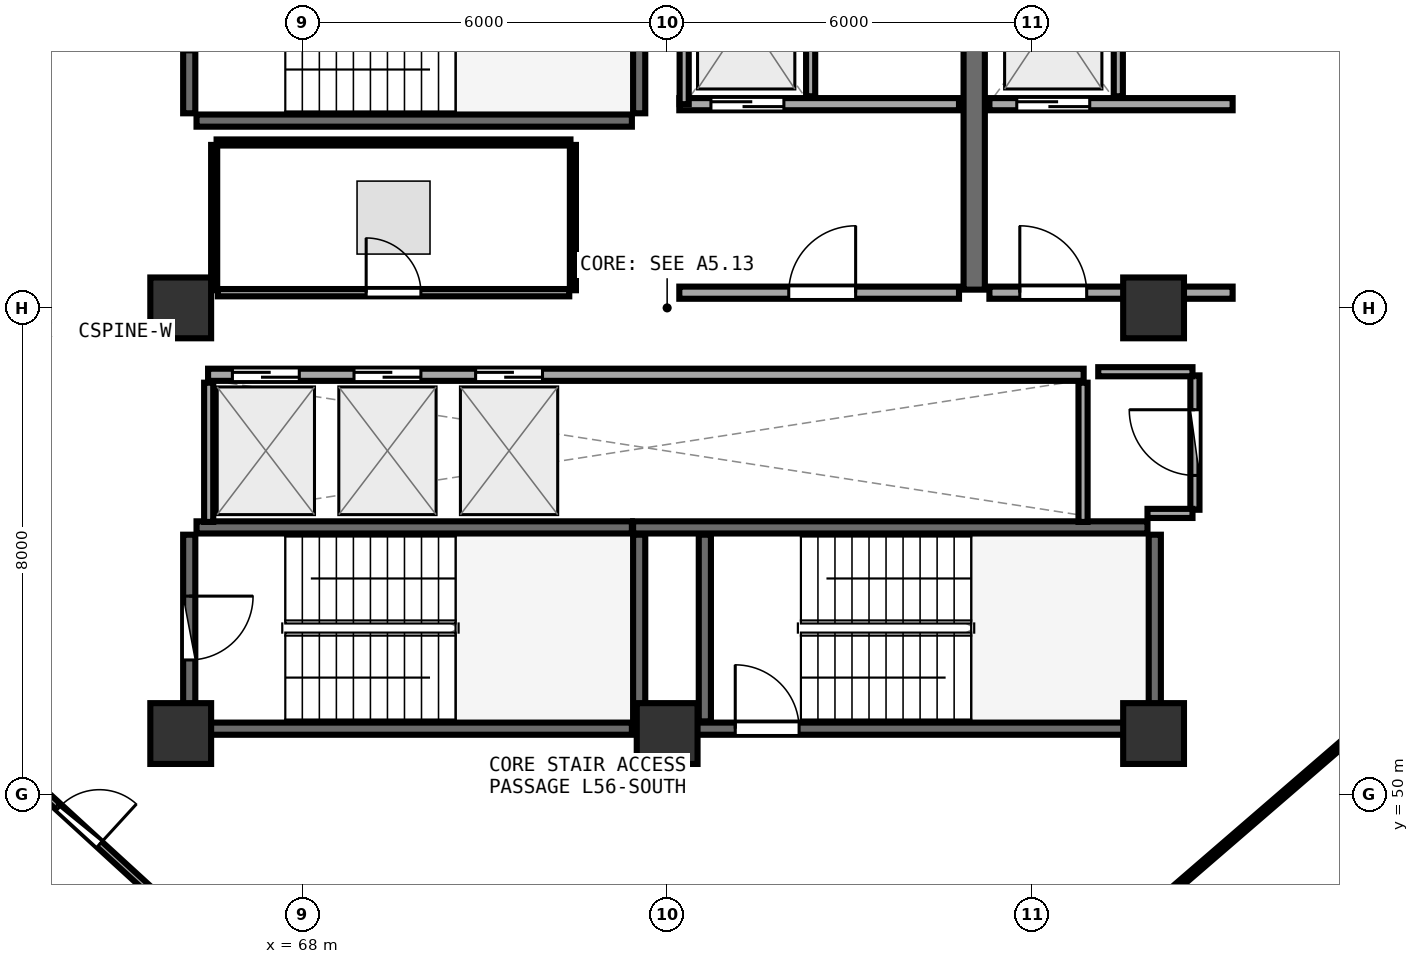
"""IFC4 building model, lengths in metres.
Left out: names, types, materials, properties, quantities, classifications, styles, units other than length and angle.
Written with IfcOpenShell. Run it as: python <this file> out.ifc"""

import sys

from ifc_helpers import new_model, si_unit, direction, frame, frame_2d, origin, origin_2d, place, context, subcontext, project, spatial, rectangle, extrude, element, fill, save


model = new_model("IFC4")
c1 = context("Model", 3, precision=1e-05, world=origin(), true_north=direction((0.0, 1.0)))
c2 = subcontext(c1, "Body", "Model", "MODEL_VIEW")
j1 = project(units=[si_unit("LENGTHUNIT", "METRE"), si_unit("PLANEANGLEUNIT", "RADIAN")], contexts=[c1])
p1 = place(None, origin())
s1 = spatial("IfcSite", under=j1, at=p1, CompositionType="ELEMENT")
p2 = place(p1, origin())
s2 = spatial("IfcBuilding", under=s1, at=p2, CompositionType="ELEMENT")
p3 = place(p2, frame((0.0, 0.0, 219.45)))
s3 = spatial("IfcBuildingStorey", under=s2, at=p3, CompositionType="ELEMENT", Elevation=219.45)
for number, where, z_axis, x_axis in (
    (1, (66.0, 51.0, 0.0), (0.0, 0.0, 1.0), (1.0, 0.0, 0.0)),
    (2, (74.0, 51.0, 0.0), (0.0, 0.0, 1.0), (1.0, 0.0, 0.0)),
    (3, (82.0, 51.0, 0.0), (0.0, 0.0, 1.0), (1.0, 0.0, 0.0)),
    (4, (82.0, 58.0, 0.0), (0.0, 0.0, 1.0), (1.0, 0.0, 0.0)),
    (5, (66.0, 58.0, 0.0), (0.0, 0.0, 1.0), (1.0, 0.0, 0.0)),
):
    element("IfcColumn", number, at=place(p3, frame(where, z_axis=z_axis, x_axis=x_axis)), inside=s3, PredefinedType="PILASTER", context=c2, shape_type="SweptSolid", body=[
        extrude(rectangle(XDim=1.0, YDim=1.0, at=origin_2d()), origin(), (0.0, 0.0, 1.0), 3.75),
    ])
p4 = place(p3, frame((66.26, 61.08, 0.0), z_axis=(0.0, 0.0, 1.0), x_axis=(1.0, 0.0, 0.0)))
e6 = element("IfcWall", 6, at=p4, inside=s3, PredefinedType="SHEAR", context=c2, shape_type="SweptSolid", body=[
    extrude(rectangle(XDim=7.16, YDim=0.2, at=frame_2d((3.58, 0.0))), origin(), (0.0, 0.0, 1.0), 3.49),
])
p5 = place(p3, frame((73.54, 61.2, 0.0), z_axis=(0.0, 0.0, 1.0), x_axis=(0.0, 1.0, 0.0)))
e7 = element("IfcWall", 7, at=p5, inside=s3, PredefinedType="SHEAR", context=c2, shape_type="SweptSolid", body=[
    extrude(rectangle(XDim=3.07, YDim=0.2, at=frame_2d((1.535, 0.0))), origin(), (0.0, 0.0, 1.0), 3.49),
])
p6 = place(p3, frame((66.14, 64.27, 0.0), z_axis=(0.0, 0.0, 1.0), x_axis=(0.0, -1.0, 0.0)))
e8 = element("IfcWall", 8, at=p6, inside=s3, PredefinedType="SHEAR", context=c2, shape_type="SweptSolid", body=[
    extrude(rectangle(XDim=3.07, YDim=0.2, at=frame_2d((1.535, 0.0))), origin(), (0.0, 0.0, 1.0), 3.49),
])
p7 = place(p6, frame((1.01, 0.0, 0.0)))
e9 = element("IfcOpeningElement", 9, at=p7, cuts=e8, PredefinedType="OPENING", context=c2, shape_type="SweptSolid", body=[
    extrude(rectangle(XDim=1.05, YDim=2.1, at=frame_2d((0.525, 1.05))), frame((0.0, 0.11, 0.0), z_axis=(0.0, -1.0, 0.0), x_axis=(1.0, 0.0, 0.0)), (0.0, 0.0, 1.0), 0.22),
])
p8 = place(p3, frame((74.0, 51.08, 0.0), z_axis=(0.0, 0.0, 1.0), x_axis=(1.0, 0.0, 0.0)))
e10 = element("IfcWall", 10, at=p8, inside=s3, PredefinedType="SHEAR", context=c2, shape_type="SweptSolid", body=[
    extrude(rectangle(XDim=7.9, YDim=0.2, at=frame_2d((3.95, 0.0))), origin(), (0.0, 0.0, 1.0), 3.49),
])
p9 = place(p8, frame((1.12, 0.0, 0.0)))
e11 = element("IfcOpeningElement", 11, at=p9, cuts=e10, PredefinedType="OPENING", context=c2, shape_type="SweptSolid", body=[
    extrude(rectangle(XDim=1.05, YDim=2.1, at=frame_2d((0.525, 1.05))), frame((0.0, 0.11, 0.0), z_axis=(0.0, -1.0, 0.0), x_axis=(1.0, 0.0, 0.0)), (0.0, 0.0, 1.0), 0.22),
])
p10 = place(p3, frame((82.02, 51.2, 0.0), z_axis=(0.0, 0.0, 1.0), x_axis=(0.0, 1.0, 0.0)))
e12 = element("IfcWall", 12, at=p10, inside=s3, PredefinedType="SHEAR", context=c2, shape_type="SweptSolid", body=[
    extrude(rectangle(XDim=3.07, YDim=0.2, at=frame_2d((1.535, 0.0))), origin(), (0.0, 0.0, 1.0), 3.49),
])
p11 = place(p3, frame((81.9, 54.39, 0.0), z_axis=(0.0, 0.0, 1.0), x_axis=(-1.0, 0.0, 0.0)))
e13 = element("IfcWall", 13, at=p11, inside=s3, PredefinedType="SHEAR", context=c2, shape_type="SweptSolid", body=[
    extrude(rectangle(XDim=8.46, YDim=0.2, at=frame_2d((4.23, 0.0))), origin(), (0.0, 0.0, 1.0), 3.49),
])
p12 = place(p3, frame((74.62, 54.27, 0.0), z_axis=(0.0, 0.0, 1.0), x_axis=(0.0, -1.0, 0.0)))
e14 = element("IfcWall", 14, at=p12, inside=s3, PredefinedType="SHEAR", context=c2, shape_type="SweptSolid", body=[
    extrude(rectangle(XDim=3.07, YDim=0.2, at=frame_2d((1.535, 0.0))), origin(), (0.0, 0.0, 1.0), 3.49),
])
p13 = place(p3, frame((66.26, 51.08, 0.0), z_axis=(0.0, 0.0, 1.0), x_axis=(1.0, 0.0, 0.0)))
e15 = element("IfcWall", 15, at=p13, inside=s3, PredefinedType="SHEAR", context=c2, shape_type="SweptSolid", body=[
    extrude(rectangle(XDim=7.16, YDim=0.2, at=frame_2d((3.58, 0.0))), origin(), (0.0, 0.0, 1.0), 3.49),
])
p14 = place(p3, frame((73.54, 51.2, 0.0), z_axis=(0.0, 0.0, 1.0), x_axis=(0.0, 1.0, 0.0)))
e16 = element("IfcWall", 16, at=p14, inside=s3, PredefinedType="SHEAR", context=c2, shape_type="SweptSolid", body=[
    extrude(rectangle(XDim=3.07, YDim=0.2, at=frame_2d((1.535, 0.0))), origin(), (0.0, 0.0, 1.0), 3.49),
])
p15 = place(p3, frame((73.42, 54.39, 0.0), z_axis=(0.0, 0.0, 1.0), x_axis=(-1.0, 0.0, 0.0)))
e17 = element("IfcWall", 17, at=p15, inside=s3, PredefinedType="SHEAR", context=c2, shape_type="SweptSolid", body=[
    extrude(rectangle(XDim=7.16, YDim=0.2, at=frame_2d((3.58, 0.0))), origin(), (0.0, 0.0, 1.0), 3.49),
])
p16 = place(p3, frame((66.14, 54.27, 0.0), z_axis=(0.0, 0.0, 1.0), x_axis=(0.0, -1.0, 0.0)))
e18 = element("IfcWall", 18, at=p16, inside=s3, PredefinedType="SHEAR", context=c2, shape_type="SweptSolid", body=[
    extrude(rectangle(XDim=3.07, YDim=0.2, at=frame_2d((1.535, 0.0))), origin(), (0.0, 0.0, 1.0), 3.49),
])
p17 = place(p16, frame((1.01, 0.0, 0.0)))
e19 = element("IfcOpeningElement", 19, at=p17, cuts=e18, PredefinedType="OPENING", context=c2, shape_type="SweptSolid", body=[
    extrude(rectangle(XDim=1.05, YDim=2.1, at=frame_2d((0.525, 1.05))), frame((0.0, 0.11, 0.0), z_axis=(0.0, -1.0, 0.0), x_axis=(1.0, 0.0, 0.0)), (0.0, 0.0, 1.0), 0.22),
])
p18 = place(p3, frame((79.05, 58.3, 0.0), z_axis=(0.0, 0.0, 1.0), x_axis=(0.0, 1.0, 0.0)))
e20 = element("IfcWall", 20, at=p18, inside=s3, PredefinedType="SHEAR", context=c2, shape_type="SweptSolid", body=[
    extrude(rectangle(XDim=6.3, YDim=0.35, at=frame_2d((3.15, 0.0))), origin(), (0.0, 0.0, 1.0), 3.49),
])
p19 = place(p3, frame((74.2, 61.35, 0.0), z_axis=(0.0, 0.0, 1.0), x_axis=(1.0, 0.0, 0.0)))
e21 = element("IfcWall", 21, at=p19, inside=s3, PredefinedType="SOLIDWALL", context=c2, shape_type="SweptSolid", body=[
    extrude(rectangle(XDim=4.6, YDim=0.2, at=frame_2d((2.3, 0.0))), origin(), (0.0, 0.0, 1.0), 3.48),
])
p20 = place(p19, frame((0.52, 0.0, 0.0)))
e22 = element("IfcOpeningElement", 22, at=p20, cuts=e21, PredefinedType="OPENING", context=c2, shape_type="SweptSolid", body=[
    extrude(rectangle(XDim=1.2, YDim=2.15, at=frame_2d((0.6, 1.075))), frame((0.0, 0.11, 0.0), z_axis=(0.0, -1.0, 0.0), x_axis=(1.0, 0.0, 0.0)), (0.0, 0.0, 1.0), 0.22),
])
p21 = place(p3, frame((74.28, 61.35, 0.0), z_axis=(0.0, 0.0, 1.0), x_axis=(0.0, 1.0, 0.0)))
e23 = element("IfcWall", 23, at=p21, inside=s3, PredefinedType="PARTITIONING", context=c2, shape_type="SweptSolid", body=[
    extrude(rectangle(XDim=2.97, YDim=0.15, at=frame_2d((1.485, 0.0))), origin(), (0.0, 0.0, 1.0), 3.48),
])
p22 = place(p3, frame((76.36, 61.48, 0.0), z_axis=(0.0, 0.0, 1.0), x_axis=(0.0, 1.0, 0.0)))
e24 = element("IfcWall", 24, at=p22, inside=s3, PredefinedType="PARTITIONING", context=c2, shape_type="SweptSolid", body=[
    extrude(rectangle(XDim=2.84, YDim=0.15, at=frame_2d((1.42, 0.0))), origin(), (0.0, 0.0, 1.0), 3.48),
])
p23 = place(p3, frame((79.3, 61.35, 0.0), z_axis=(0.0, 0.0, 1.0), x_axis=(1.0, 0.0, 0.0)))
e25 = element("IfcWall", 25, at=p23, inside=s3, PredefinedType="SOLIDWALL", context=c2, shape_type="SweptSolid", body=[
    extrude(rectangle(XDim=4.0, YDim=0.2, at=frame_2d((2.0, 0.0))), origin(), (0.0, 0.0, 1.0), 2.775),
])
p24 = place(p23, frame((0.45, 0.0, 0.0)))
e26 = element("IfcOpeningElement", 26, at=p24, cuts=e25, PredefinedType="OPENING", context=c2, shape_type="SweptSolid", body=[
    extrude(rectangle(XDim=1.2, YDim=2.15, at=frame_2d((0.6, 1.075))), frame((0.0, 0.11, 0.0), z_axis=(0.0, -1.0, 0.0), x_axis=(1.0, 0.0, 0.0)), (0.0, 0.0, 1.0), 0.22),
])
p25 = place(p3, frame((81.42, 61.48, 0.0), z_axis=(0.0, 0.0, 1.0), x_axis=(0.0, 1.0, 0.0)))
e27 = element("IfcWall", 27, at=p25, inside=s3, PredefinedType="PARTITIONING", context=c2, shape_type="SweptSolid", body=[
    extrude(rectangle(XDim=2.84, YDim=0.15, at=frame_2d((1.42, 0.0))), origin(), (0.0, 0.0, 1.0), 3.48),
])
p26 = place(p3, frame((74.2, 58.25, 0.0), z_axis=(0.0, 0.0, 1.0), x_axis=(1.0, 0.0, 0.0)))
e28 = element("IfcWall", 28, at=p26, inside=s3, PredefinedType="SOLIDWALL", context=c2, shape_type="SweptSolid", body=[
    extrude(rectangle(XDim=4.6, YDim=0.2, at=frame_2d((2.3, 0.0))), origin(), (0.0, 0.0, 1.0), 3.48),
])
p27 = place(p26, frame((1.8, 0.0, 0.0)))
e29 = element("IfcOpeningElement", 29, at=p27, cuts=e28, PredefinedType="OPENING", context=c2, shape_type="SweptSolid", body=[
    extrude(rectangle(XDim=1.1, YDim=2.1, at=frame_2d((0.55, 1.05))), frame((0.0, 0.11, 0.0), z_axis=(0.0, -1.0, 0.0), x_axis=(1.0, 0.0, 0.0)), (0.0, 0.0, 1.0), 0.22),
])
p28 = place(p3, frame((79.3, 58.25, 0.0), z_axis=(0.0, 0.0, 1.0), x_axis=(1.0, 0.0, 0.0)))
e30 = element("IfcWall", 30, at=p28, inside=s3, PredefinedType="SOLIDWALL", context=c2, shape_type="SweptSolid", body=[
    extrude(rectangle(XDim=4.0, YDim=0.2, at=frame_2d((2.0, 0.0))), origin(), (0.0, 0.0, 1.0), 2.775),
])
p29 = place(p28, frame((0.5, 0.0, 0.0)))
e31 = element("IfcOpeningElement", 31, at=p29, cuts=e30, PredefinedType="OPENING", context=c2, shape_type="SweptSolid", body=[
    extrude(rectangle(XDim=1.1, YDim=2.1, at=frame_2d((0.55, 1.05))), frame((0.0, 0.11, 0.0), z_axis=(0.0, -1.0, 0.0), x_axis=(1.0, 0.0, 0.0)), (0.0, 0.0, 1.0), 0.22),
])
p30 = place(p3, frame((66.45, 56.9, 0.0), z_axis=(0.0, 0.0, 1.0), x_axis=(1.0, 0.0, 0.0)))
e32 = element("IfcWall", 32, at=p30, inside=s3, PredefinedType="SOLIDWALL", context=c2, shape_type="SweptSolid", body=[
    extrude(rectangle(XDim=14.4, YDim=0.2, at=frame_2d((7.2, 0.0))), origin(), (0.0, 0.0, 1.0), 3.48),
])
p31 = place(p30, frame((0.4, 0.0, 0.0)))
e33 = element("IfcOpeningElement", 33, at=p31, cuts=e32, PredefinedType="OPENING", context=c2, shape_type="SweptSolid", body=[
    extrude(rectangle(XDim=1.1, YDim=2.1, at=frame_2d((0.55, 1.05))), frame((0.0, 0.11, 0.0), z_axis=(0.0, -1.0, 0.0), x_axis=(1.0, 0.0, 0.0)), (0.0, 0.0, 1.0), 0.22),
])
p32 = place(p30, frame((2.4, 0.0, 0.0)))
e34 = element("IfcOpeningElement", 34, at=p32, cuts=e32, PredefinedType="OPENING", context=c2, shape_type="SweptSolid", body=[
    extrude(rectangle(XDim=1.1, YDim=2.1, at=frame_2d((0.55, 1.05))), frame((0.0, 0.11, 0.0), z_axis=(0.0, -1.0, 0.0), x_axis=(1.0, 0.0, 0.0)), (0.0, 0.0, 1.0), 0.22),
])
p33 = place(p30, frame((4.4, 0.0, 0.0)))
e35 = element("IfcOpeningElement", 35, at=p33, cuts=e32, PredefinedType="OPENING", context=c2, shape_type="SweptSolid", body=[
    extrude(rectangle(XDim=1.1, YDim=2.1, at=frame_2d((0.55, 1.05))), frame((0.0, 0.11, 0.0), z_axis=(0.0, -1.0, 0.0), x_axis=(1.0, 0.0, 0.0)), (0.0, 0.0, 1.0), 0.22),
])
for number, where, z_axis, x_axis in (
    (36, (66.46, 54.48, 0.0), (0.0, 0.0, 1.0), (0.0, 1.0, 0.0)),
    (37, (80.84, 54.48, 0.0), (0.0, 0.0, 1.0), (0.0, 1.0, 0.0)),
):
    element("IfcWall", number, at=place(p3, frame(where, z_axis=z_axis, x_axis=x_axis)), inside=s3, PredefinedType="PARTITIONING", context=c2, shape_type="SweptSolid", body=[
        extrude(rectangle(XDim=2.29, YDim=0.15, at=frame_2d((1.145, 0.0))), origin(), (0.0, 0.0, 1.0), 3.48),
    ])
p34 = place(p3, frame((82.68, 54.68, 0.0), z_axis=(0.0, 0.0, 1.0), x_axis=(0.0, 1.0, 0.0)))
e38 = element("IfcWall", 38, at=p34, inside=s3, PredefinedType="PARTITIONING", context=c2, shape_type="SweptSolid", body=[
    extrude(rectangle(XDim=2.21, YDim=0.15, at=frame_2d((1.105, 0.0))), origin(), (0.0, 0.0, 1.0), 3.48),
])
p35 = place(p34, frame((0.565, 0.0, 0.0)))
e39 = element("IfcOpeningElement", 39, at=p35, cuts=e38, PredefinedType="OPENING", context=c2, shape_type="SweptSolid", body=[
    extrude(rectangle(XDim=1.08, YDim=2.1, at=frame_2d((0.54, 1.05))), frame((0.0, 0.085, 0.0), z_axis=(0.0, -1.0, 0.0), x_axis=(1.0, 0.0, 0.0)), (0.0, 0.0, 1.0), 0.17),
])
p36 = place(p3, frame((66.61, 58.25, 0.0), z_axis=(0.0, 0.0, 1.0), x_axis=(1.0, 0.0, 0.0)))
e40 = element("IfcWall", 40, at=p36, inside=s3, PredefinedType="PARTITIONING", context=c2, shape_type="SweptSolid", body=[
    extrude(rectangle(XDim=5.78, YDim=0.12, at=frame_2d((2.89, 0.0))), origin(), (0.0, 0.0, 1.0), 3.48),
])
p37 = place(p36, frame((2.44, 0.0, 0.0)))
e41 = element("IfcOpeningElement", 41, at=p37, cuts=e40, PredefinedType="OPENING", context=c2, shape_type="SweptSolid", body=[
    extrude(rectangle(XDim=0.9, YDim=2.08, at=frame_2d((0.45, 1.04))), frame((0.0, 0.07, 0.0), z_axis=(0.0, -1.0, 0.0), x_axis=(1.0, 0.0, 0.0)), (0.0, 0.0, 1.0), 0.14),
])
p38 = place(p3, frame((62.803, 50.879, 0.0), z_axis=(0.0, 0.0, 1.0), x_axis=(0.737723633035, -0.675102837545, 0.0)))
e42 = element("IfcWall", 42, at=p38, inside=s3, PredefinedType="PARTITIONING", context=c2, shape_type="SweptSolid", body=[
    extrude(rectangle(XDim=4.144, YDim=0.12, at=frame_2d((2.072, 0.0))), origin(), (0.0, 0.0, 1.0), 3.025),
])
p39 = place(p38, frame((1.622, 0.0, 0.0)))
e43 = element("IfcOpeningElement", 43, at=p39, cuts=e42, PredefinedType="OPENING", context=c2, shape_type="SweptSolid", body=[
    extrude(rectangle(XDim=0.9, YDim=2.08, at=frame_2d((0.45, 1.04))), frame((0.0, 0.07, 0.0), z_axis=(0.0, -1.0, 0.0), x_axis=(1.0, 0.0, 0.0)), (0.0, 0.0, 1.0), 0.14),
])
p40 = place(p3, frame((81.9, 54.62, 0.0), z_axis=(0.0, 0.0, 1.0), x_axis=(1.0, 0.0, 0.0)))
e44 = element("IfcWall", 44, at=p40, inside=s3, PredefinedType="PARTITIONING", context=c2, shape_type="SweptSolid", body=[
    extrude(rectangle(XDim=0.74, YDim=0.15, at=frame_2d((0.37, 0.0))), origin(), (0.0, 0.0, 1.0), 2.775),
])
p41 = place(p3, frame((82.64, 56.95, 0.0), z_axis=(0.0, 0.0, 1.0), x_axis=(-1.0, 0.0, 0.0)))
e45 = element("IfcWall", 45, at=p41, inside=s3, PredefinedType="PARTITIONING", context=c2, shape_type="SweptSolid", body=[
    extrude(rectangle(XDim=1.55, YDim=0.15, at=frame_2d((0.775, 0.0))), origin(), (0.0, 0.0, 1.0), 2.775),
])
p42 = place(p3, frame((72.45, 58.29, 0.0), z_axis=(0.0, 0.0, 1.0), x_axis=(0.0, 1.0, 0.0)))
e46 = element("IfcWall", 46, at=p42, inside=s3, PredefinedType="PARTITIONING", context=c2, shape_type="SweptSolid", body=[
    extrude(rectangle(XDim=2.39, YDim=0.1, at=frame_2d((1.195, 0.0))), origin(), (0.0, 0.0, 1.0), 3.48),
])
p43 = place(p3, frame((72.41, 60.72, 0.0), z_axis=(0.0, 0.0, 1.0), x_axis=(-1.0, 0.0, 0.0)))
e47 = element("IfcWall", 47, at=p43, inside=s3, PredefinedType="PARTITIONING", context=c2, shape_type="SweptSolid", body=[
    extrude(rectangle(XDim=5.82, YDim=0.1, at=frame_2d((2.91, 0.0))), origin(), (0.0, 0.0, 1.0), 3.48),
])
p44 = place(p3, frame((66.55, 60.68, 0.0), z_axis=(0.0, 0.0, 1.0), x_axis=(0.0, -1.0, 0.0)))
e48 = element("IfcWall", 48, at=p44, inside=s3, PredefinedType="PARTITIONING", context=c2, shape_type="SweptSolid", body=[
    extrude(rectangle(XDim=2.39, YDim=0.1, at=frame_2d((1.195, 0.0))), origin(), (0.0, 0.0, 1.0), 3.48),
])
p45 = place(p3, frame((81.367, 47.604, 0.0), z_axis=(0.0, 0.0, 1.0), x_axis=(0.756843194568, 0.653596495428, 0.0)))
e49 = element("IfcWall", 49, at=p45, inside=s3, PredefinedType="PARTITIONING", context=c2, shape_type="SweptSolid", body=[
    extrude(rectangle(XDim=5.167, YDim=0.1, at=frame_2d((2.583, 0.0))), origin(), (0.0, 0.0, 1.0), 3.025),
])
p46 = place(p9, origin())
e50 = element("IfcDoor", 50, at=p46, inside=s3, OperationType="SINGLE_SWING_LEFT", PredefinedType="DOOR", context=c2, shape_type="SweptSolid", body=[
    extrude(rectangle(XDim=1.05, YDim=2.1, at=frame_2d((0.525, 1.05))), frame((0.0, 0.025, 0.0), z_axis=(0.0, -1.0, 0.0), x_axis=(1.0, 0.0, 0.0)), (0.0, 0.0, 1.0), 0.05),
])
fill(e11, e50)
p47 = place(p17, origin())
e51 = element("IfcDoor", 51, at=p47, inside=s3, OperationType="SINGLE_SWING_LEFT", PredefinedType="DOOR", context=c2, shape_type="SweptSolid", body=[
    extrude(rectangle(XDim=1.05, YDim=2.1, at=frame_2d((0.525, 1.05))), frame((0.0, 0.025, 0.0), z_axis=(0.0, -1.0, 0.0), x_axis=(1.0, 0.0, 0.0)), (0.0, 0.0, 1.0), 0.05),
])
fill(e19, e51)
p48 = place(p20, origin())
e52 = element("IfcDoor", 52, at=p48, inside=s3, OperationType="DOUBLE_DOOR_SLIDING", PredefinedType="DOOR", context=c2, shape_type="SweptSolid", body=[
    extrude(rectangle(XDim=1.2, YDim=2.15, at=frame_2d((0.6, 1.075))), frame((0.0, 0.025, 0.0), z_axis=(0.0, -1.0, 0.0), x_axis=(1.0, 0.0, 0.0)), (0.0, 0.0, 1.0), 0.05),
])
fill(e22, e52)
p49 = place(p24, origin())
e53 = element("IfcDoor", 53, at=p49, inside=s3, OperationType="DOUBLE_DOOR_SLIDING", PredefinedType="DOOR", context=c2, shape_type="SweptSolid", body=[
    extrude(rectangle(XDim=1.2, YDim=2.15, at=frame_2d((0.6, 1.075))), frame((0.0, 0.025, 0.0), z_axis=(0.0, -1.0, 0.0), x_axis=(1.0, 0.0, 0.0)), (0.0, 0.0, 1.0), 0.05),
])
fill(e26, e53)
p50 = place(p27, frame((1.1, 0.0, 0.0), z_axis=(0.0, 0.0, 1.0), x_axis=(-1.0, 0.0, 0.0)))
e54 = element("IfcDoor", 54, at=p50, inside=s3, OperationType="SINGLE_SWING_LEFT", PredefinedType="DOOR", context=c2, shape_type="SweptSolid", body=[
    extrude(rectangle(XDim=1.1, YDim=2.1, at=frame_2d((0.55, 1.05))), frame((0.0, 0.025, 0.0), z_axis=(0.0, -1.0, 0.0), x_axis=(1.0, 0.0, 0.0)), (0.0, 0.0, 1.0), 0.05),
])
fill(e29, e54)
p51 = place(p29, frame((1.1, 0.0, 0.0), z_axis=(0.0, 0.0, 1.0), x_axis=(-1.0, 0.0, 0.0)))
e55 = element("IfcDoor", 55, at=p51, inside=s3, OperationType="SINGLE_SWING_RIGHT", PredefinedType="DOOR", context=c2, shape_type="SweptSolid", body=[
    extrude(rectangle(XDim=1.1, YDim=2.1, at=frame_2d((0.55, 1.05))), frame((0.0, 0.025, 0.0), z_axis=(0.0, -1.0, 0.0), x_axis=(1.0, 0.0, 0.0)), (0.0, 0.0, 1.0), 0.05),
])
fill(e31, e55)
p52 = place(p31, origin())
e56 = element("IfcDoor", 56, at=p52, inside=s3, OperationType="DOUBLE_DOOR_SLIDING", PredefinedType="DOOR", context=c2, shape_type="SweptSolid", body=[
    extrude(rectangle(XDim=1.1, YDim=2.1, at=frame_2d((0.55, 1.05))), frame((0.0, 0.025, 0.0), z_axis=(0.0, -1.0, 0.0), x_axis=(1.0, 0.0, 0.0)), (0.0, 0.0, 1.0), 0.05),
])
fill(e33, e56)
p53 = place(p32, origin())
e57 = element("IfcDoor", 57, at=p53, inside=s3, OperationType="DOUBLE_DOOR_SLIDING", PredefinedType="DOOR", context=c2, shape_type="SweptSolid", body=[
    extrude(rectangle(XDim=1.1, YDim=2.1, at=frame_2d((0.55, 1.05))), frame((0.0, 0.025, 0.0), z_axis=(0.0, -1.0, 0.0), x_axis=(1.0, 0.0, 0.0)), (0.0, 0.0, 1.0), 0.05),
])
fill(e34, e57)
p54 = place(p33, origin())
e58 = element("IfcDoor", 58, at=p54, inside=s3, OperationType="DOUBLE_DOOR_SLIDING", PredefinedType="DOOR", context=c2, shape_type="SweptSolid", body=[
    extrude(rectangle(XDim=1.1, YDim=2.1, at=frame_2d((0.55, 1.05))), frame((0.0, 0.025, 0.0), z_axis=(0.0, -1.0, 0.0), x_axis=(1.0, 0.0, 0.0)), (0.0, 0.0, 1.0), 0.05),
])
fill(e35, e58)
p55 = place(p35, origin())
e59 = element("IfcDoor", 59, at=p55, inside=s3, OperationType="SINGLE_SWING_RIGHT", PredefinedType="DOOR", context=c2, shape_type="SweptSolid", body=[
    extrude(rectangle(XDim=1.08, YDim=2.1, at=frame_2d((0.54, 1.05))), frame((0.0, 0.025, 0.0), z_axis=(0.0, -1.0, 0.0), x_axis=(1.0, 0.0, 0.0)), (0.0, 0.0, 1.0), 0.05),
])
fill(e39, e59)
p56 = place(p37, origin())
e60 = element("IfcDoor", 60, at=p56, inside=s3, OperationType="SINGLE_SWING_LEFT", PredefinedType="DOOR", context=c2, shape_type="SweptSolid", body=[
    extrude(rectangle(XDim=0.9, YDim=2.08, at=frame_2d((0.45, 1.04))), frame((0.0, 0.025, 0.0), z_axis=(0.0, -1.0, 0.0), x_axis=(1.0, 0.0, 0.0)), (0.0, 0.0, 1.0), 0.05),
])
fill(e41, e60)
p57 = place(p39, origin())
e61 = element("IfcDoor", 61, at=p57, inside=s3, OperationType="SINGLE_SWING_RIGHT", PredefinedType="DOOR", context=c2, shape_type="SweptSolid", body=[
    extrude(rectangle(XDim=0.9, YDim=2.08, at=frame_2d((0.45, 1.04))), frame((0.0, 0.025, 0.0), z_axis=(0.0, -1.0, 0.0), x_axis=(1.0, 0.0, 0.0)), (0.0, 0.0, 1.0), 0.05),
])
fill(e43, e61)
save(model, sys.argv[1])
